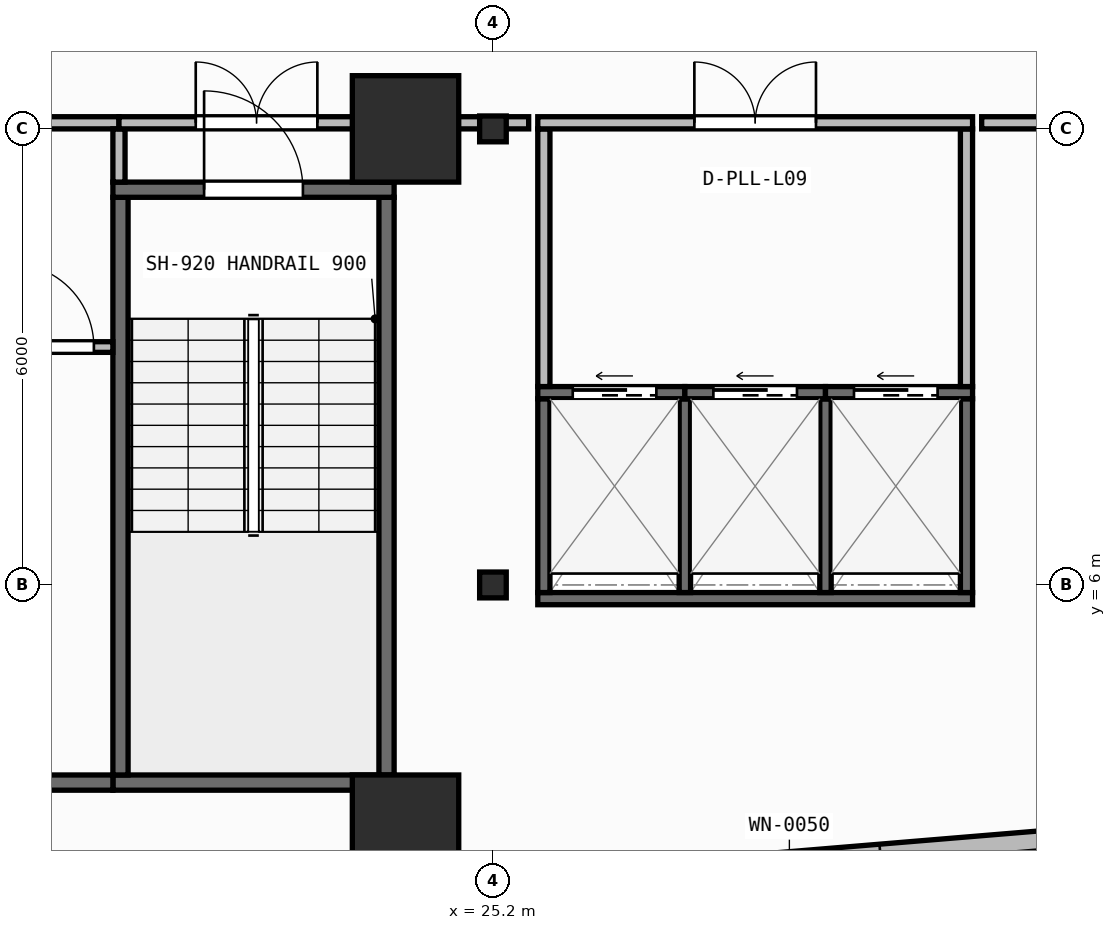
"""IFC4 building model, lengths in metres.
Left out: names, types, materials, properties, quantities, classifications, styles, units other than length and angle.
Written with IfcOpenShell. Run it as: python <this file> out.ifc"""

import sys

from ifc_helpers import new_model, si_unit, direction, frame, frame_2d, origin, origin_2d, place, context, subcontext, project, spatial, rectangle, i_section, extrude, element, fill, save


model = new_model("IFC4")
c1 = context("Model", 3, precision=1e-05, world=origin(), true_north=direction((0.0, 1.0)))
c2 = subcontext(c1, "Body", "Model", "MODEL_VIEW")
j1 = project(units=[si_unit("LENGTHUNIT", "METRE"), si_unit("PLANEANGLEUNIT", "RADIAN")], contexts=[c1])
p1 = place(None, origin())
s1 = spatial("IfcSite", under=j1, at=p1, CompositionType="ELEMENT")
p2 = place(p1, origin())
s2 = spatial("IfcBuilding", under=s1, at=p2, CompositionType="ELEMENT")
p3 = place(p2, frame((0.0, 0.0, 38.3)))
s3 = spatial("IfcBuildingStorey", under=s2, at=p3, CompositionType="ELEMENT", Elevation=38.3)
p4 = place(p3, frame((24.05, 2.8, 0.0), z_axis=(0.0, 0.0, 1.0), x_axis=(1.0, 0.0, 0.0)))
e1 = element("IfcColumn", 1, at=p4, inside=s3, PredefinedType="COLUMN", context=c2, shape_type="SweptSolid", body=[
    extrude(rectangle(XDim=1.4, YDim=1.4, at=origin_2d()), origin(), (0.0, 0.0, 1.0), 3.95),
])
p5 = place(p3, frame((25.2, 6.0, 0.0), z_axis=(0.0, 0.0, 1.0), x_axis=(1.0, 0.0, 0.0)))
e2 = element("IfcColumn", 2, at=p5, inside=s3, PredefinedType="COLUMN", context=c2, shape_type="SweptSolid", body=[
    extrude(i_section(OverallWidth=0.35, OverallDepth=0.34, WebThickness=0.016, FlangeThickness=0.028, at=origin_2d()), origin(), (0.0, 0.0, 1.0), 3.95),
])
p6 = place(p3, frame((24.05, 12.0, 0.0), z_axis=(0.0, 0.0, 1.0), x_axis=(1.0, 0.0, 0.0)))
e3 = element("IfcColumn", 3, at=p6, inside=s3, PredefinedType="COLUMN", context=c2, shape_type="SweptSolid", body=[
    extrude(rectangle(XDim=1.4, YDim=1.4, at=origin_2d()), origin(), (0.0, 0.0, 1.0), 3.95),
])
p7 = place(p3, frame((25.2, 12.0, 0.0), z_axis=(0.0, 0.0, 1.0), x_axis=(1.0, 0.0, 0.0)))
e4 = element("IfcColumn", 4, at=p7, inside=s3, PredefinedType="COLUMN", context=c2, shape_type="SweptSolid", body=[
    extrude(i_section(OverallWidth=0.35, OverallDepth=0.34, WebThickness=0.016, FlangeThickness=0.028, at=origin_2d()), origin(), (0.0, 0.0, 1.0), 3.95),
])
p8 = place(p3, frame((2.76, 0.174, 0.0), z_axis=(0.0, 0.0, 1.0), x_axis=(0.996571478456, 0.082736257641, 0.0)))
e5 = element("IfcWall", 5, at=p8, inside=s3, PredefinedType="STANDARD", context=c2, shape_type="SweptSolid", body=[
    extrude(rectangle(XDim=52.861, YDim=0.26, at=frame_2d((26.431, 0.0))), origin(), (0.0, 0.0, 1.0), 3.71),
])
p9 = place(p8, frame((25.231, 0.0, 0.9)))
e6 = element("IfcOpeningElement", 6, at=p9, cuts=e5, PredefinedType="OPENING", context=c2, shape_type="SweptSolid", body=[
    extrude(rectangle(XDim=2.4, YDim=1.65, at=frame_2d((1.2, 0.825))), frame((0.0, 0.14, 0.0), z_axis=(0.0, -1.0, 0.0), x_axis=(1.0, 0.0, 0.0)), (0.0, 0.0, 1.0), 0.28),
])
p10 = place(p3, frame((20.2, 3.4, 0.0), z_axis=(0.0, 0.0, 1.0), x_axis=(1.0, 0.0, 0.0)))
e7 = element("IfcWall", 7, at=p10, inside=s3, PredefinedType="SHEAR", context=c2, shape_type="SweptSolid", body=[
    extrude(rectangle(XDim=3.7, YDim=0.2, at=frame_2d((1.85, 0.0))), origin(), (0.0, 0.0, 1.0), 3.71),
])
for number, where, z_axis, x_axis in (
    (8, (20.3, 3.5, 0.0), (0.0, 0.0, 1.0), (0.0, 1.0, 0.0)),
    (9, (23.8, 3.5, 0.0), (0.0, 0.0, 1.0), (0.0, 1.0, 0.0)),
):
    element("IfcWall", number, at=place(p3, frame(where, z_axis=z_axis, x_axis=x_axis)), inside=s3, PredefinedType="SHEAR", context=c2, shape_type="SweptSolid", body=[
        extrude(rectangle(XDim=7.6, YDim=0.2, at=frame_2d((3.8, 0.0))), origin(), (0.0, 0.0, 1.0), 3.71),
    ])
p11 = place(p3, frame((20.2, 11.2, 0.0), z_axis=(0.0, 0.0, 1.0), x_axis=(1.0, 0.0, 0.0)))
e10 = element("IfcWall", 10, at=p11, inside=s3, PredefinedType="SHEAR", context=c2, shape_type="SweptSolid", body=[
    extrude(rectangle(XDim=3.7, YDim=0.2, at=frame_2d((1.85, 0.0))), origin(), (0.0, 0.0, 1.0), 3.71),
])
p12 = place(p11, frame((1.2, 0.0, 0.0)))
e11 = element("IfcOpeningElement", 11, at=p12, cuts=e10, PredefinedType="OPENING", context=c2, shape_type="SweptSolid", body=[
    extrude(rectangle(XDim=1.3, YDim=2.15, at=frame_2d((0.65, 1.075))), frame((0.0, 0.11, 0.0), z_axis=(0.0, -1.0, 0.0), x_axis=(1.0, 0.0, 0.0)), (0.0, 0.0, 1.0), 0.22),
])
p13 = place(p3, frame((6.5, 3.4, 0.0), z_axis=(0.0, 0.0, 1.0), x_axis=(1.0, 0.0, 0.0)))
e12 = element("IfcWall", 12, at=p13, inside=s3, PredefinedType="SHEAR", context=c2, shape_type="SweptSolid", body=[
    extrude(rectangle(XDim=13.7, YDim=0.2, at=frame_2d((6.85, 0.0))), origin(), (0.0, 0.0, 1.0), 3.71),
])
p14 = place(p3, frame((25.79, 5.82, 0.0), z_axis=(0.0, 0.0, 1.0), x_axis=(1.0, 0.0, 0.0)))
e13 = element("IfcWall", 13, at=p14, inside=s3, PredefinedType="SHEAR", context=c2, shape_type="SweptSolid", body=[
    extrude(rectangle(XDim=5.72, YDim=0.16, at=frame_2d((2.86, 0.0))), origin(), (0.0, 0.0, 1.0), 3.71),
])
for number, where, z_axis, x_axis in (
    (14, (25.87, 5.9, 0.0), (0.0, 0.0, 1.0), (0.0, 1.0, 0.0)),
    (15, (31.43, 5.9, 0.0), (0.0, 0.0, 1.0), (0.0, 1.0, 0.0)),
):
    element("IfcWall", number, at=place(p3, frame(where, z_axis=z_axis, x_axis=x_axis)), inside=s3, PredefinedType="SHEAR", context=c2, shape_type="SweptSolid", body=[
        extrude(rectangle(XDim=2.55, YDim=0.16, at=frame_2d((1.275, 0.0))), origin(), (0.0, 0.0, 1.0), 3.71),
    ])
for number, where, z_axis, x_axis in (
    (16, (27.725, 5.9, 0.0), (0.0, 0.0, 1.0), (0.0, 1.0, 0.0)),
    (17, (29.575, 5.9, 0.0), (0.0, 0.0, 1.0), (0.0, 1.0, 0.0)),
):
    element("IfcWall", number, at=place(p3, frame(where, z_axis=z_axis, x_axis=x_axis)), inside=s3, PredefinedType="SHEAR", context=c2, shape_type="SweptSolid", body=[
        extrude(rectangle(XDim=2.55, YDim=0.15, at=frame_2d((1.275, 0.0))), origin(), (0.0, 0.0, 1.0), 3.71),
    ])
p15 = place(p3, frame((25.79, 8.53, 0.0), z_axis=(0.0, 0.0, 1.0), x_axis=(1.0, 0.0, 0.0)))
e18 = element("IfcWall", 18, at=p15, inside=s3, PredefinedType="SHEAR", context=c2, shape_type="SweptSolid", body=[
    extrude(rectangle(XDim=1.935, YDim=0.16, at=frame_2d((0.968, 0.0))), origin(), (0.0, 0.0, 1.0), 3.71),
])
p16 = place(p15, frame((0.46, 0.0, 0.0)))
e19 = element("IfcOpeningElement", 19, at=p16, cuts=e18, PredefinedType="OPENING", context=c2, shape_type="SweptSolid", body=[
    extrude(rectangle(XDim=1.1, YDim=2.15, at=frame_2d((0.55, 1.075))), frame((0.0, 0.09, 0.0), z_axis=(0.0, -1.0, 0.0), x_axis=(1.0, 0.0, 0.0)), (0.0, 0.0, 1.0), 0.18),
])
p17 = place(p3, frame((27.725, 8.53, 0.0), z_axis=(0.0, 0.0, 1.0), x_axis=(1.0, 0.0, 0.0)))
e20 = element("IfcWall", 20, at=p17, inside=s3, PredefinedType="SHEAR", context=c2, shape_type="SweptSolid", body=[
    extrude(rectangle(XDim=1.85, YDim=0.16, at=frame_2d((0.925, 0.0))), origin(), (0.0, 0.0, 1.0), 3.71),
])
p18 = place(p17, frame((0.375, 0.0, 0.0)))
e21 = element("IfcOpeningElement", 21, at=p18, cuts=e20, PredefinedType="OPENING", context=c2, shape_type="SweptSolid", body=[
    extrude(rectangle(XDim=1.1, YDim=2.15, at=frame_2d((0.55, 1.075))), frame((0.0, 0.09, 0.0), z_axis=(0.0, -1.0, 0.0), x_axis=(1.0, 0.0, 0.0)), (0.0, 0.0, 1.0), 0.18),
])
p19 = place(p3, frame((29.575, 8.53, 0.0), z_axis=(0.0, 0.0, 1.0), x_axis=(1.0, 0.0, 0.0)))
e22 = element("IfcWall", 22, at=p19, inside=s3, PredefinedType="SHEAR", context=c2, shape_type="SweptSolid", body=[
    extrude(rectangle(XDim=1.935, YDim=0.16, at=frame_2d((0.968, 0.0))), origin(), (0.0, 0.0, 1.0), 3.71),
])
p20 = place(p19, frame((0.375, 0.0, 0.0)))
e23 = element("IfcOpeningElement", 23, at=p20, cuts=e22, PredefinedType="OPENING", context=c2, shape_type="SweptSolid", body=[
    extrude(rectangle(XDim=1.1, YDim=2.15, at=frame_2d((0.55, 1.075))), frame((0.0, 0.09, 0.0), z_axis=(0.0, -1.0, 0.0), x_axis=(1.0, 0.0, 0.0)), (0.0, 0.0, 1.0), 0.18),
])
p21 = place(p3, frame((18.61, 9.13, 0.0), z_axis=(0.0, 0.0, 1.0), x_axis=(1.0, 0.0, 0.0)))
e24 = element("IfcWall", 24, at=p21, inside=s3, PredefinedType="PARTITIONING", context=c2, shape_type="SweptSolid", body=[
    extrude(rectangle(XDim=1.59, YDim=0.14, at=frame_2d((0.795, 0.0))), origin(), (0.0, 0.0, 1.0), 3.71),
])
p22 = place(p21, frame((0.24, 0.0, 0.0)))
e25 = element("IfcOpeningElement", 25, at=p22, cuts=e24, PredefinedType="OPENING", context=c2, shape_type="SweptSolid", body=[
    extrude(rectangle(XDim=1.1, YDim=2.1, at=frame_2d((0.55, 1.05))), frame((0.0, 0.08, 0.0), z_axis=(0.0, -1.0, 0.0), x_axis=(1.0, 0.0, 0.0)), (0.0, 0.0, 1.0), 0.16),
])
p23 = place(p3, frame((12.58, 12.08, 0.0), z_axis=(0.0, 0.0, 1.0), x_axis=(1.0, 0.0, 0.0)))
e26 = element("IfcWall", 26, at=p23, inside=s3, PredefinedType="PARTITIONING", context=c2, shape_type="SweptSolid", body=[
    extrude(rectangle(XDim=7.7, YDim=0.16, at=frame_2d((3.85, 0.0))), origin(), (0.0, 0.0, 1.0), 3.073),
])
p24 = place(p23, frame((3.05, 0.0, 0.0)))
e27 = element("IfcOpeningElement", 27, at=p24, cuts=e26, PredefinedType="OPENING", context=c2, shape_type="SweptSolid", body=[
    extrude(rectangle(XDim=1.6, YDim=2.05, at=frame_2d((0.8, 1.025))), frame((0.0, 0.09, 0.0), z_axis=(0.0, -1.0, 0.0), x_axis=(1.0, 0.0, 0.0)), (0.0, 0.0, 1.0), 0.18),
])
p25 = place(p3, frame((20.28, 11.3, 0.0), z_axis=(0.0, 0.0, 1.0), x_axis=(0.0, 1.0, 0.0)))
e28 = element("IfcWall", 28, at=p25, inside=s3, PredefinedType="PARTITIONING", context=c2, shape_type="SweptSolid", body=[
    extrude(rectangle(XDim=0.7, YDim=0.16, at=frame_2d((0.35, 0.0))), origin(), (0.0, 0.0, 1.0), 3.71),
])
p26 = place(p3, frame((20.28, 12.08, 0.0), z_axis=(0.0, 0.0, 1.0), x_axis=(1.0, 0.0, 0.0)))
e29 = element("IfcWall", 29, at=p26, inside=s3, PredefinedType="PARTITIONING", context=c2, shape_type="SweptSolid", body=[
    extrude(rectangle(XDim=3.62, YDim=0.16, at=frame_2d((1.81, 0.0))), origin(), (0.0, 0.0, 1.0), 3.073),
])
p27 = place(p26, frame((1.01, 0.0, 0.0)))
e30 = element("IfcOpeningElement", 30, at=p27, cuts=e29, PredefinedType="OPENING", context=c2, shape_type="SweptSolid", body=[
    extrude(rectangle(XDim=1.6, YDim=2.05, at=frame_2d((0.8, 1.025))), frame((0.0, 0.09, 0.0), z_axis=(0.0, -1.0, 0.0), x_axis=(1.0, 0.0, 0.0)), (0.0, 0.0, 1.0), 0.18),
])
p28 = place(p3, frame((23.82, 11.3, 0.0), z_axis=(0.0, 0.0, 1.0), x_axis=(0.0, 1.0, 0.0)))
e31 = element("IfcWall", 31, at=p28, inside=s3, PredefinedType="PARTITIONING", context=c2, shape_type="SweptSolid", body=[
    extrude(rectangle(XDim=0.7, YDim=0.16, at=frame_2d((0.35, 0.0))), origin(), (0.0, 0.0, 1.0), 3.71),
])
for number, where, z_axis, x_axis in (
    (32, (25.87, 8.61, 0.0), (0.0, 0.0, 1.0), (0.0, 1.0, 0.0)),
    (33, (31.43, 8.61, 0.0), (0.0, 0.0, 1.0), (0.0, 1.0, 0.0)),
):
    element("IfcWall", number, at=place(p3, frame(where, z_axis=z_axis, x_axis=x_axis)), inside=s3, PredefinedType="PARTITIONING", context=c2, shape_type="SweptSolid", body=[
        extrude(rectangle(XDim=3.39, YDim=0.16, at=frame_2d((1.695, 0.0))), origin(), (0.0, 0.0, 1.0), 3.71),
    ])
p29 = place(p3, frame((25.79, 12.08, 0.0), z_axis=(0.0, 0.0, 1.0), x_axis=(1.0, 0.0, 0.0)))
e34 = element("IfcWall", 34, at=p29, inside=s3, PredefinedType="PARTITIONING", context=c2, shape_type="SweptSolid", body=[
    extrude(rectangle(XDim=5.72, YDim=0.16, at=frame_2d((2.86, 0.0))), origin(), (0.0, 0.0, 1.0), 3.073),
])
p30 = place(p29, frame((2.06, 0.0, 0.0)))
e35 = element("IfcOpeningElement", 35, at=p30, cuts=e34, PredefinedType="OPENING", context=c2, shape_type="SweptSolid", body=[
    extrude(rectangle(XDim=1.6, YDim=2.05, at=frame_2d((0.8, 1.025))), frame((0.0, 0.09, 0.0), z_axis=(0.0, -1.0, 0.0), x_axis=(1.0, 0.0, 0.0)), (0.0, 0.0, 1.0), 0.18),
])
p31 = place(p3, frame((24.02, 12.08, 0.0), z_axis=(0.0, 0.0, 1.0), x_axis=(1.0, 0.0, 0.0)))
e36 = element("IfcWall", 36, at=p31, inside=s3, PredefinedType="PARTITIONING", context=c2, shape_type="SweptSolid", body=[
    extrude(rectangle(XDim=1.65, YDim=0.16, at=frame_2d((0.825, 0.0))), origin(), (0.0, 0.0, 1.0), 3.073),
])
p32 = place(p3, frame((31.63, 12.08, 0.0), z_axis=(0.0, 0.0, 1.0), x_axis=(1.0, 0.0, 0.0)))
e37 = element("IfcWall", 37, at=p32, inside=s3, PredefinedType="PARTITIONING", context=c2, shape_type="SweptSolid", body=[
    extrude(rectangle(XDim=11.181, YDim=0.16, at=frame_2d((5.59, 0.0))), origin(), (0.0, 0.0, 1.0), 3.073),
])
p33 = place(p12, origin())
e38 = element("IfcDoor", 38, at=p33, inside=s3, OperationType="SINGLE_SWING_LEFT", PredefinedType="DOOR", context=c2, shape_type="SweptSolid", body=[
    extrude(rectangle(XDim=1.3, YDim=2.15, at=frame_2d((0.65, 1.075))), frame((0.0, 0.025, 0.0), z_axis=(0.0, -1.0, 0.0), x_axis=(1.0, 0.0, 0.0)), (0.0, 0.0, 1.0), 0.05),
])
fill(e11, e38)
p34 = place(p16, origin())
e39 = element("IfcDoor", 39, at=p34, inside=s3, OperationType="SLIDING_TO_LEFT", PredefinedType="DOOR", context=c2, shape_type="SweptSolid", body=[
    extrude(rectangle(XDim=1.1, YDim=2.15, at=frame_2d((0.55, 1.075))), frame((0.0, 0.025, 0.0), z_axis=(0.0, -1.0, 0.0), x_axis=(1.0, 0.0, 0.0)), (0.0, 0.0, 1.0), 0.05),
])
fill(e19, e39)
p35 = place(p18, origin())
e40 = element("IfcDoor", 40, at=p35, inside=s3, OperationType="SLIDING_TO_LEFT", PredefinedType="DOOR", context=c2, shape_type="SweptSolid", body=[
    extrude(rectangle(XDim=1.1, YDim=2.15, at=frame_2d((0.55, 1.075))), frame((0.0, 0.025, 0.0), z_axis=(0.0, -1.0, 0.0), x_axis=(1.0, 0.0, 0.0)), (0.0, 0.0, 1.0), 0.05),
])
fill(e21, e40)
p36 = place(p20, origin())
e41 = element("IfcDoor", 41, at=p36, inside=s3, OperationType="SLIDING_TO_LEFT", PredefinedType="DOOR", context=c2, shape_type="SweptSolid", body=[
    extrude(rectangle(XDim=1.1, YDim=2.15, at=frame_2d((0.55, 1.075))), frame((0.0, 0.025, 0.0), z_axis=(0.0, -1.0, 0.0), x_axis=(1.0, 0.0, 0.0)), (0.0, 0.0, 1.0), 0.05),
])
fill(e23, e41)
p37 = place(p22, origin())
e42 = element("IfcDoor", 42, at=p37, inside=s3, OperationType="SINGLE_SWING_LEFT", PredefinedType="DOOR", context=c2, shape_type="SweptSolid", body=[
    extrude(rectangle(XDim=1.1, YDim=2.1, at=frame_2d((0.55, 1.05))), frame((0.0, 0.025, 0.0), z_axis=(0.0, -1.0, 0.0), x_axis=(1.0, 0.0, 0.0)), (0.0, 0.0, 1.0), 0.05),
])
fill(e25, e42)
p38 = place(p27, origin())
e43 = element("IfcDoor", 43, at=p38, inside=s3, OperationType="DOUBLE_DOOR_SINGLE_SWING", PredefinedType="DOOR", context=c2, shape_type="SweptSolid", body=[
    extrude(rectangle(XDim=1.6, YDim=2.05, at=frame_2d((0.8, 1.025))), frame((0.0, 0.025, 0.0), z_axis=(0.0, -1.0, 0.0), x_axis=(1.0, 0.0, 0.0)), (0.0, 0.0, 1.0), 0.05),
])
fill(e30, e43)
p39 = place(p30, origin())
e44 = element("IfcDoor", 44, at=p39, inside=s3, OperationType="DOUBLE_DOOR_SINGLE_SWING", PredefinedType="DOOR", context=c2, shape_type="SweptSolid", body=[
    extrude(rectangle(XDim=1.6, YDim=2.05, at=frame_2d((0.8, 1.025))), frame((0.0, 0.025, 0.0), z_axis=(0.0, -1.0, 0.0), x_axis=(1.0, 0.0, 0.0)), (0.0, 0.0, 1.0), 0.05),
])
fill(e35, e44)
save(model, sys.argv[1])
